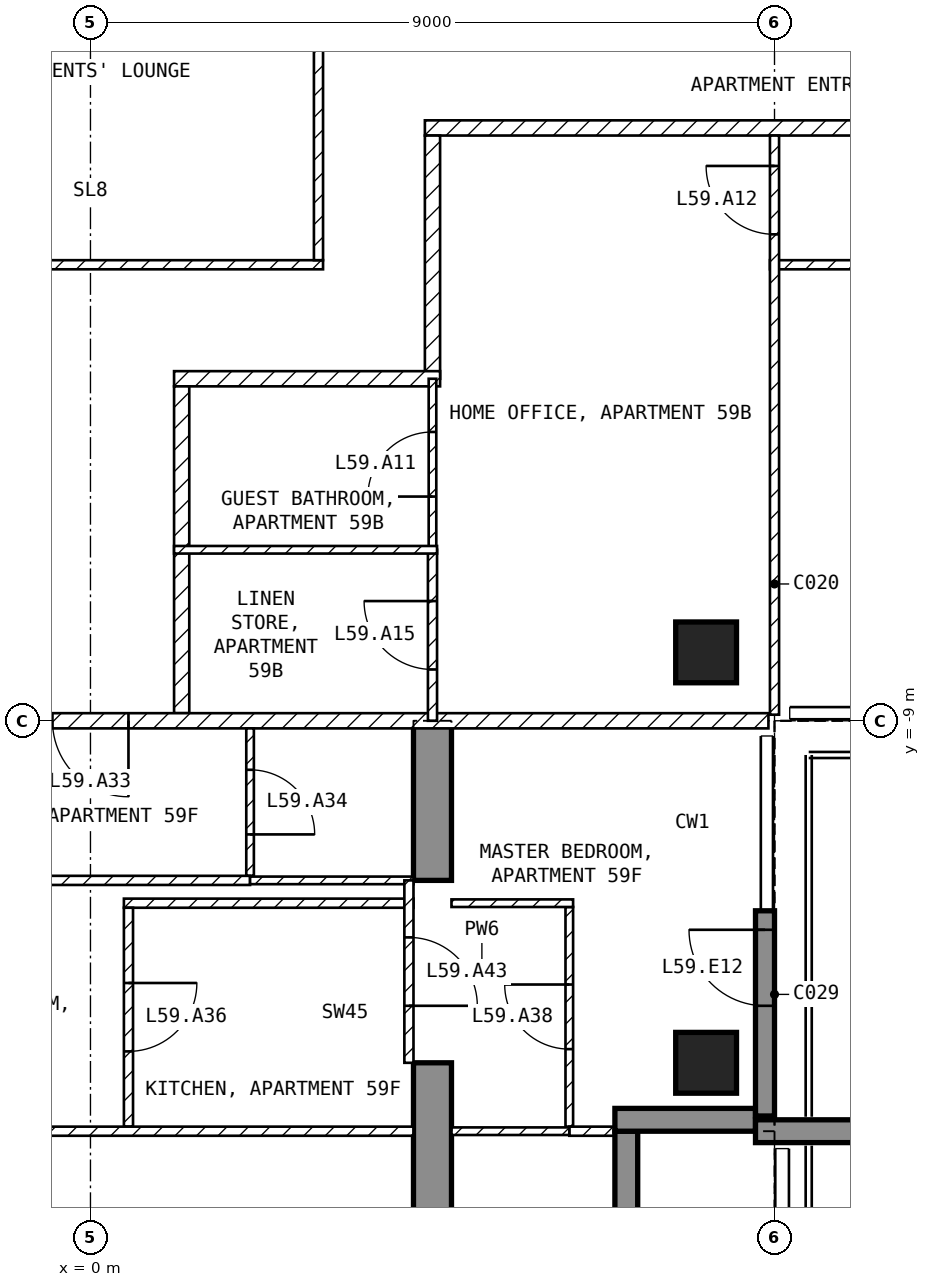
"""IFC4 building model, lengths in metres.
Left out: names, types, materials, properties, quantities, classifications, styles, units other than length and angle.
Written with IfcOpenShell. Run it as: python <this file> out.ifc"""

import sys

from ifc_helpers import new_model, si_unit, direction, frame, frame_2d, origin, origin_2d, place, context, subcontext, project, spatial, polyline, rectangle, outline, extrude, element, fill, save


model = new_model("IFC4")
c1 = context("Model", 3, precision=1e-05, world=origin(), true_north=direction((0.0, 1.0)))
c2 = subcontext(c1, "Body", "Model", "MODEL_VIEW")
j1 = project(units=[si_unit("LENGTHUNIT", "METRE"), si_unit("PLANEANGLEUNIT", "RADIAN")], contexts=[c1])
p1 = place(None, origin())
s1 = spatial("IfcSite", under=j1, at=p1, CompositionType="ELEMENT")
p2 = place(p1, origin())
s2 = spatial("IfcBuilding", under=s1, at=p2, CompositionType="ELEMENT")
p3 = place(p2, frame((0.0, 0.0, 236.0)))
s3 = spatial("IfcBuildingStorey", under=s2, at=p3, CompositionType="ELEMENT", Elevation=236.0)
for number, where, z_axis, x_axis in (
    (1, (8.1, -13.5, -0.25), (0.0, 0.0, 1.0), (1.0, 0.0, 0.0)),
    (2, (8.1, -8.1, -0.25), (0.0, 0.0, 1.0), (1.0, 0.0, 0.0)),
):
    element("IfcColumn", number, at=place(p3, frame(where, z_axis=z_axis, x_axis=x_axis)), inside=s3, PredefinedType="COLUMN", context=c2, shape_type="SweptSolid", body=[
        extrude(rectangle(XDim=0.8, YDim=0.8, at=origin_2d()), origin(), (0.0, 0.0, 1.0), 3.5),
    ])
p4 = place(p3, frame((4.25, -16.7, -0.25), z_axis=(1.0, 0.0, 0.0), x_axis=(0.0, 1.0, 0.0)))
e3 = element("IfcWall", 3, at=p4, inside=s3, PredefinedType="SHEAR", context=c2, shape_type="SweptSolid", body=[
    extrude(outline(polyline([(0.0, 0.0), (3.2, 0.0), (3.2, 2.65), (5.6, 2.65), (5.6, 0.0), (7.7, 0.0), (7.7, 3.5), (0.0, 3.5), (0.0, 0.0)])), origin(), (0.0, 0.0, 1.0), 0.5),
])
p5 = place(p3, frame((8.875, -14.2, 0.0), z_axis=(0.0, 0.0, 1.0), x_axis=(0.0, 1.0, 0.0)))
e4 = element("IfcWall", 4, at=p5, inside=s3, PredefinedType="SOLIDWALL", context=c2, shape_type="SweptSolid", body=[
    extrude(rectangle(XDim=2.7, YDim=0.25, at=frame_2d((1.35, 0.0))), origin(), (0.0, 0.0, 1.0), 3.25),
])
p6 = place(p5, frame((1.45, 0.0, 0.0)))
e5 = element("IfcOpeningElement", 5, at=p6, cuts=e4, PredefinedType="OPENING", context=c2, shape_type="SweptSolid", body=[
    extrude(rectangle(XDim=1.0, YDim=2.4, at=frame_2d((0.5, 1.2))), frame((0.0, 0.135, 0.0), z_axis=(0.0, -1.0, 0.0), x_axis=(1.0, 0.0, 0.0)), (0.0, 0.0, 1.0), 0.27),
])
p7 = place(p3, frame((7.05, -16.2, 0.0), z_axis=(0.0, 0.0, 1.0), x_axis=(0.0, 1.0, 0.0)))
e6 = element("IfcWall", 6, at=p7, inside=s3, PredefinedType="SOLIDWALL", context=c2, shape_type="SweptSolid", body=[
    extrude(rectangle(XDim=1.8, YDim=0.3, at=frame_2d((0.9, 0.0))), origin(), (0.0, 0.0, 1.0), 3.25),
])
p8 = place(p3, frame((6.9, -14.25, 0.0), z_axis=(0.0, 0.0, 1.0), x_axis=(1.0, 0.0, 0.0)))
e7 = element("IfcWall", 7, at=p8, inside=s3, PredefinedType="SOLIDWALL", context=c2, shape_type="SweptSolid", body=[
    extrude(rectangle(XDim=1.85, YDim=0.3, at=frame_2d((0.925, 0.0))), origin(), (0.0, 0.0, 1.0), 3.25),
])
p9 = place(p3, frame((8.75, -14.4, 0.0), z_axis=(0.0, 0.0, 1.0), x_axis=(1.0, 0.0, 0.0)))
e8 = element("IfcWall", 8, at=p9, inside=s3, PredefinedType="SOLIDWALL", context=c2, shape_type="SweptSolid", body=[
    extrude(rectangle(XDim=2.95, YDim=0.3, at=frame_2d((1.475, 0.0))), origin(), (0.0, 0.0, 1.0), 3.25),
])
p10 = place(p3, frame((-3.06, -3.0, 0.0), z_axis=(0.0, 0.0, 1.0), x_axis=(1.0, 0.0, 0.0)))
e9 = element("IfcWall", 9, at=p10, inside=s3, PredefinedType="PARTITIONING", context=c2, shape_type="SweptSolid", body=[
    extrude(rectangle(XDim=6.12, YDim=0.12, at=frame_2d((3.06, 0.0))), origin(), (0.0, 0.0, 1.0), 3.25),
])
p11 = place(p3, frame((3.0, -2.94, 0.0), z_axis=(0.0, 0.0, 1.0), x_axis=(0.0, 1.0, 0.0)))
e10 = element("IfcWall", 10, at=p11, inside=s3, PredefinedType="PARTITIONING", context=c2, shape_type="SweptSolid", body=[
    extrude(rectangle(XDim=5.88, YDim=0.12, at=frame_2d((2.94, 0.0))), origin(), (0.0, 0.0, 1.0), 3.25),
])
p12 = place(p3, frame((21.6, -1.2, 0.0), z_axis=(0.0, 0.0, 1.0), x_axis=(-1.0, 0.0, 0.0)))
e11 = element("IfcWall", 11, at=p12, inside=s3, PredefinedType="PARTITIONING", context=c2, shape_type="SweptSolid", body=[
    extrude(rectangle(XDim=17.2, YDim=0.2, at=frame_2d((8.6, 0.0))), origin(), (0.0, 0.0, 1.0), 3.25),
])
p13 = place(p12, frame((10.3, 0.0, 0.0)))
e12 = element("IfcOpeningElement", 12, at=p13, cuts=e11, PredefinedType="OPENING", context=c2, shape_type="SweptSolid", body=[
    extrude(rectangle(XDim=1.0, YDim=2.1, at=frame_2d((0.5, 1.05))), frame((0.0, 0.11, 0.0), z_axis=(0.0, -1.0, 0.0), x_axis=(1.0, 0.0, 0.0)), (0.0, 0.0, 1.0), 0.22),
])
p14 = place(p3, frame((4.5, -1.3, 0.0), z_axis=(0.0, 0.0, 1.0), x_axis=(0.0, -1.0, 0.0)))
e13 = element("IfcWall", 13, at=p14, inside=s3, PredefinedType="PARTITIONING", context=c2, shape_type="SweptSolid", body=[
    extrude(rectangle(XDim=3.2, YDim=0.2, at=frame_2d((1.6, 0.0))), origin(), (0.0, 0.0, 1.0), 3.25),
])
p15 = place(p3, frame((4.6, -4.5, 0.0), z_axis=(0.0, 0.0, 1.0), x_axis=(-1.0, 0.0, 0.0)))
e14 = element("IfcWall", 14, at=p15, inside=s3, PredefinedType="PARTITIONING", context=c2, shape_type="SweptSolid", body=[
    extrude(rectangle(XDim=3.5, YDim=0.2, at=frame_2d((1.75, 0.0))), origin(), (0.0, 0.0, 1.0), 3.25),
])
p16 = place(p3, frame((1.2, -4.6, 0.0), z_axis=(0.0, 0.0, 1.0), x_axis=(0.0, -1.0, 0.0)))
e15 = element("IfcWall", 15, at=p16, inside=s3, PredefinedType="PARTITIONING", context=c2, shape_type="SweptSolid", body=[
    extrude(rectangle(XDim=4.3, YDim=0.2, at=frame_2d((2.15, 0.0))), origin(), (0.0, 0.0, 1.0), 3.25),
])
p17 = place(p3, frame((8.92, -9.0, 0.0), z_axis=(0.0, 0.0, 1.0), x_axis=(-1.0, 0.0, 0.0)))
e16 = element("IfcWall", 16, at=p17, inside=s3, PredefinedType="PARTITIONING", context=c2, shape_type="SweptSolid", body=[
    extrude(rectangle(XDim=17.84, YDim=0.2, at=frame_2d((8.92, 0.0))), origin(), (0.0, 0.0, 1.0), 3.25),
])
p18 = place(p17, frame((8.42, 0.0, 0.0)))
e17 = element("IfcOpeningElement", 17, at=p18, cuts=e16, PredefinedType="OPENING", context=c2, shape_type="SweptSolid", body=[
    extrude(rectangle(XDim=1.0, YDim=2.1, at=frame_2d((0.5, 1.05))), frame((0.0, 0.11, 0.0), z_axis=(0.0, -1.0, 0.0), x_axis=(1.0, 0.0, 0.0)), (0.0, 0.0, 1.0), 0.22),
])
p19 = place(p3, frame((17.4, -3.0, 0.0), z_axis=(0.0, 0.0, 1.0), x_axis=(-1.0, 0.0, 0.0)))
e18 = element("IfcWall", 18, at=p19, inside=s3, PredefinedType="PARTITIONING", context=c2, shape_type="SweptSolid", body=[
    extrude(rectangle(XDim=8.46, YDim=0.12, at=frame_2d((4.23, 0.0))), origin(), (0.0, 0.0, 1.0), 3.25),
])
p20 = place(p19, frame((0.45, 0.0, 0.0)))
e19 = element("IfcOpeningElement", 19, at=p20, cuts=e18, PredefinedType="OPENING", context=c2, shape_type="SweptSolid", body=[
    extrude(rectangle(XDim=0.9, YDim=2.1, at=frame_2d((0.45, 1.05))), frame((0.0, 0.07, 0.0), z_axis=(0.0, -1.0, 0.0), x_axis=(1.0, 0.0, 0.0)), (0.0, 0.0, 1.0), 0.14),
])
p21 = place(p19, frame((6.15, 0.0, 0.0)))
e20 = element("IfcOpeningElement", 20, at=p21, cuts=e18, PredefinedType="OPENING", context=c2, shape_type="SweptSolid", body=[
    extrude(rectangle(XDim=0.9, YDim=2.1, at=frame_2d((0.45, 1.05))), frame((0.0, 0.07, 0.0), z_axis=(0.0, -1.0, 0.0), x_axis=(1.0, 0.0, 0.0)), (0.0, 0.0, 1.0), 0.14),
])
p22 = place(p3, frame((9.0, -8.92, 0.0), z_axis=(0.0, 0.0, 1.0), x_axis=(0.0, 1.0, 0.0)))
e21 = element("IfcWall", 21, at=p22, inside=s3, PredefinedType="PARTITIONING", context=c2, shape_type="SweptSolid", body=[
    extrude(rectangle(XDim=7.62, YDim=0.12, at=frame_2d((3.81, 0.0))), origin(), (0.0, 0.0, 1.0), 3.25),
])
p23 = place(p22, frame((6.32, 0.0, 0.0)))
e22 = element("IfcOpeningElement", 22, at=p23, cuts=e21, PredefinedType="OPENING", context=c2, shape_type="SweptSolid", body=[
    extrude(rectangle(XDim=0.9, YDim=2.1, at=frame_2d((0.45, 1.05))), frame((0.0, 0.07, 0.0), z_axis=(0.0, -1.0, 0.0), x_axis=(1.0, 0.0, 0.0)), (0.0, 0.0, 1.0), 0.14),
])
p24 = place(p3, frame((4.5, -6.75, 0.0), z_axis=(0.0, 0.0, 1.0), x_axis=(0.0, 1.0, 0.0)))
e23 = element("IfcWall", 23, at=p24, inside=s3, PredefinedType="PARTITIONING", context=c2, shape_type="SweptSolid", body=[
    extrude(rectangle(XDim=2.25, YDim=0.1, at=frame_2d((1.125, 0.0))), origin(), (0.0, 0.0, 1.0), 3.25),
])
p25 = place(p24, frame((0.7, 0.0, 0.0)))
e24 = element("IfcOpeningElement", 24, at=p25, cuts=e23, PredefinedType="OPENING", context=c2, shape_type="SweptSolid", body=[
    extrude(rectangle(XDim=0.85, YDim=2.1, at=frame_2d((0.425, 1.05))), frame((0.0, 0.06, 0.0), z_axis=(0.0, -1.0, 0.0), x_axis=(1.0, 0.0, 0.0)), (0.0, 0.0, 1.0), 0.12),
])
p26 = place(p3, frame((4.5, -9.0, 0.0), z_axis=(0.0, 0.0, 1.0), x_axis=(0.0, 1.0, 0.0)))
e25 = element("IfcWall", 25, at=p26, inside=s3, PredefinedType="PARTITIONING", context=c2, shape_type="SweptSolid", body=[
    extrude(rectangle(XDim=2.25, YDim=0.12, at=frame_2d((1.125, 0.0))), origin(), (0.0, 0.0, 1.0), 3.25),
])
p27 = place(p26, frame((0.675, 0.0, 0.0)))
e26 = element("IfcOpeningElement", 26, at=p27, cuts=e25, PredefinedType="OPENING", context=c2, shape_type="SweptSolid", body=[
    extrude(rectangle(XDim=0.9, YDim=2.1, at=frame_2d((0.45, 1.05))), frame((0.0, 0.07, 0.0), z_axis=(0.0, -1.0, 0.0), x_axis=(1.0, 0.0, 0.0)), (0.0, 0.0, 1.0), 0.14),
])
p28 = place(p3, frame((4.56, -6.75, 0.0), z_axis=(0.0, 0.0, 1.0), x_axis=(-1.0, 0.0, 0.0)))
e27 = element("IfcWall", 27, at=p28, inside=s3, PredefinedType="PARTITIONING", context=c2, shape_type="SweptSolid", body=[
    extrude(rectangle(XDim=3.46, YDim=0.1, at=frame_2d((1.73, 0.0))), origin(), (0.0, 0.0, 1.0), 3.25),
])
p29 = place(p3, frame((2.1, -9.1, 0.0), z_axis=(0.0, 0.0, 1.0), x_axis=(0.0, -1.0, 0.0)))
e28 = element("IfcWall", 28, at=p29, inside=s3, PredefinedType="PARTITIONING", context=c2, shape_type="SweptSolid", body=[
    extrude(rectangle(XDim=1.94, YDim=0.1, at=frame_2d((0.97, 0.0))), origin(), (0.0, 0.0, 1.0), 3.25),
])
p30 = place(p29, frame((0.545, 0.0, 0.0)))
e29 = element("IfcOpeningElement", 29, at=p30, cuts=e28, PredefinedType="OPENING", context=c2, shape_type="SweptSolid", body=[
    extrude(rectangle(XDim=0.85, YDim=2.1, at=frame_2d((0.425, 1.05))), frame((0.0, 0.06, 0.0), z_axis=(0.0, -1.0, 0.0), x_axis=(1.0, 0.0, 0.0)), (0.0, 0.0, 1.0), 0.12),
])
p31 = place(p3, frame((2.1, -11.1, 0.0), z_axis=(0.0, 0.0, 1.0), x_axis=(-1.0, 0.0, 0.0)))
e30 = element("IfcWall", 30, at=p31, inside=s3, PredefinedType="PARTITIONING", context=c2, shape_type="SweptSolid", body=[
    extrude(rectangle(XDim=6.35, YDim=0.12, at=frame_2d((3.175, 0.0))), origin(), (0.0, 0.0, 1.0), 3.25),
])
p32 = place(p31, frame((2.725, 0.0, 0.0)))
e31 = element("IfcOpeningElement", 31, at=p32, cuts=e30, PredefinedType="OPENING", context=c2, shape_type="SweptSolid", body=[
    extrude(rectangle(XDim=0.9, YDim=2.1, at=frame_2d((0.45, 1.05))), frame((0.0, 0.07, 0.0), z_axis=(0.0, -1.0, 0.0), x_axis=(1.0, 0.0, 0.0)), (0.0, 0.0, 1.0), 0.14),
])
p33 = place(p3, frame((4.25, -11.1, 0.0), z_axis=(0.0, 0.0, 1.0), x_axis=(-1.0, 0.0, 0.0)))
e32 = element("IfcWall", 32, at=p33, inside=s3, PredefinedType="PARTITIONING", context=c2, shape_type="SweptSolid", body=[
    extrude(rectangle(XDim=2.15, YDim=0.1, at=frame_2d((1.075, 0.0))), origin(), (0.0, 0.0, 1.0), 3.25),
])
p34 = place(p3, frame((4.25, -11.4, 0.0), z_axis=(0.0, 0.0, 1.0), x_axis=(-1.0, 0.0, 0.0)))
e33 = element("IfcWall", 33, at=p34, inside=s3, PredefinedType="PARTITIONING", context=c2, shape_type="SweptSolid", body=[
    extrude(rectangle(XDim=3.81, YDim=0.12, at=frame_2d((1.905, 0.0))), origin(), (0.0, 0.0, 1.0), 3.25),
])
p35 = place(p3, frame((0.5, -11.46, 0.0), z_axis=(0.0, 0.0, 1.0), x_axis=(0.0, -1.0, 0.0)))
e34 = element("IfcWall", 34, at=p35, inside=s3, PredefinedType="PARTITIONING", context=c2, shape_type="SweptSolid", body=[
    extrude(rectangle(XDim=2.88, YDim=0.12, at=frame_2d((1.44, 0.0))), origin(), (0.0, 0.0, 1.0), 3.25),
])
p36 = place(p35, frame((0.99, 0.0, 0.0)))
e35 = element("IfcOpeningElement", 35, at=p36, cuts=e34, PredefinedType="OPENING", context=c2, shape_type="SweptSolid", body=[
    extrude(rectangle(XDim=0.9, YDim=2.1, at=frame_2d((0.45, 1.05))), frame((0.0, 0.07, 0.0), z_axis=(0.0, -1.0, 0.0), x_axis=(1.0, 0.0, 0.0)), (0.0, 0.0, 1.0), 0.14),
])
p37 = place(p3, frame((4.25, -14.4, 0.0), z_axis=(0.0, 0.0, 1.0), x_axis=(-1.0, 0.0, 0.0)))
e36 = element("IfcWall", 36, at=p37, inside=s3, PredefinedType="PARTITIONING", context=c2, shape_type="SweptSolid", body=[
    extrude(rectangle(XDim=8.5, YDim=0.12, at=frame_2d((4.25, 0.0))), origin(), (0.0, 0.0, 1.0), 3.25),
])
p38 = place(p37, frame((5.675, 0.0, 0.0)))
e37 = element("IfcOpeningElement", 37, at=p38, cuts=e36, PredefinedType="OPENING", context=c2, shape_type="SweptSolid", body=[
    extrude(rectangle(XDim=0.9, YDim=2.1, at=frame_2d((0.45, 1.05))), frame((0.0, 0.07, 0.0), z_axis=(0.0, -1.0, 0.0), x_axis=(1.0, 0.0, 0.0)), (0.0, 0.0, 1.0), 0.14),
])
p39 = place(p3, frame((6.3, -14.34, 0.0), z_axis=(0.0, 0.0, 1.0), x_axis=(0.0, 1.0, 0.0)))
e38 = element("IfcWall", 38, at=p39, inside=s3, PredefinedType="PARTITIONING", context=c2, shape_type="SweptSolid", body=[
    extrude(rectangle(XDim=2.89, YDim=0.1, at=frame_2d((1.445, 0.0))), origin(), (0.0, 0.0, 1.0), 3.25),
])
p40 = place(p39, frame((1.02, 0.0, 0.0)))
e39 = element("IfcOpeningElement", 39, at=p40, cuts=e38, PredefinedType="OPENING", context=c2, shape_type="SweptSolid", body=[
    extrude(rectangle(XDim=0.85, YDim=2.1, at=frame_2d((0.425, 1.05))), frame((0.0, 0.06, 0.0), z_axis=(0.0, -1.0, 0.0), x_axis=(1.0, 0.0, 0.0)), (0.0, 0.0, 1.0), 0.12),
])
p41 = place(p3, frame((6.35, -11.4, 0.0), z_axis=(0.0, 0.0, 1.0), x_axis=(-1.0, 0.0, 0.0)))
e40 = element("IfcWall", 40, at=p41, inside=s3, PredefinedType="PARTITIONING", context=c2, shape_type="SweptSolid", body=[
    extrude(rectangle(XDim=1.6, YDim=0.1, at=frame_2d((0.8, 0.0))), origin(), (0.0, 0.0, 1.0), 3.25),
])
p42 = place(p3, frame((7.12, -14.4, 0.0), z_axis=(0.0, 0.0, 1.0), x_axis=(-1.0, 0.0, 0.0)))
e41 = element("IfcWall", 41, at=p42, inside=s3, PredefinedType="PARTITIONING", context=c2, shape_type="SweptSolid", body=[
    extrude(rectangle(XDim=0.82, YDim=0.12, at=frame_2d((0.41, 0.0))), origin(), (0.0, 0.0, 1.0), 3.25),
])
p43 = place(p3, frame((6.3, -14.4, 0.0), z_axis=(0.0, 0.0, 1.0), x_axis=(-1.0, 0.0, 0.0)))
e42 = element("IfcWall", 42, at=p43, inside=s3, PredefinedType="PARTITIONING", context=c2, shape_type="SweptSolid", body=[
    extrude(rectangle(XDim=1.55, YDim=0.1, at=frame_2d((0.775, 0.0))), origin(), (0.0, 0.0, 1.0), 3.25),
])
p44 = place(p3, frame((4.19, -11.1, 0.0), z_axis=(0.0, 0.0, 1.0), x_axis=(0.0, -1.0, 0.0)))
e43 = element("IfcWall", 43, at=p44, inside=s3, PredefinedType="PARTITIONING", context=c2, shape_type="SweptSolid", body=[
    extrude(rectangle(XDim=2.4, YDim=0.12, at=frame_2d((1.2, 0.0))), origin(), (0.0, 0.0, 1.0), 2.4),
])
p45 = place(p44, frame((0.75, 0.0, 0.0)))
e44 = element("IfcOpeningElement", 44, at=p45, cuts=e43, PredefinedType="OPENING", context=c2, shape_type="SweptSolid", body=[
    extrude(rectangle(XDim=0.9, YDim=2.1, at=frame_2d((0.45, 1.05))), frame((0.0, 0.07, 0.0), z_axis=(0.0, -1.0, 0.0), x_axis=(1.0, 0.0, 0.0)), (0.0, 0.0, 1.0), 0.14),
])
p46 = place(p6, origin())
e45 = element("IfcDoor", 45, at=p46, inside=s3, OperationType="SINGLE_SWING_RIGHT", PredefinedType="DOOR", context=c2, shape_type="SweptSolid", body=[
    extrude(rectangle(XDim=1.0, YDim=2.4, at=frame_2d((0.5, 1.2))), frame((0.0, 0.025, 0.0), z_axis=(0.0, -1.0, 0.0), x_axis=(1.0, 0.0, 0.0)), (0.0, 0.0, 1.0), 0.05),
])
fill(e5, e45)
p47 = place(p25, origin())
e46 = element("IfcDoor", 46, at=p47, inside=s3, OperationType="SINGLE_SWING_LEFT", PredefinedType="DOOR", context=c2, shape_type="SweptSolid", body=[
    extrude(rectangle(XDim=0.85, YDim=2.1, at=frame_2d((0.425, 1.05))), frame((0.0, 0.025, 0.0), z_axis=(0.0, -1.0, 0.0), x_axis=(1.0, 0.0, 0.0)), (0.0, 0.0, 1.0), 0.05),
])
fill(e24, e46)
p48 = place(p23, origin())
e47 = element("IfcDoor", 47, at=p48, inside=s3, OperationType="SINGLE_SWING_RIGHT", PredefinedType="DOOR", context=c2, shape_type="SweptSolid", body=[
    extrude(rectangle(XDim=0.9, YDim=2.1, at=frame_2d((0.45, 1.05))), frame((0.0, 0.025, 0.0), z_axis=(0.0, -1.0, 0.0), x_axis=(1.0, 0.0, 0.0)), (0.0, 0.0, 1.0), 0.05),
])
fill(e22, e47)
p49 = place(p27, origin())
e48 = element("IfcDoor", 48, at=p49, inside=s3, OperationType="SINGLE_SWING_RIGHT", PredefinedType="DOOR", context=c2, shape_type="SweptSolid", body=[
    extrude(rectangle(XDim=0.9, YDim=2.1, at=frame_2d((0.45, 1.05))), frame((0.0, 0.025, 0.0), z_axis=(0.0, -1.0, 0.0), x_axis=(1.0, 0.0, 0.0)), (0.0, 0.0, 1.0), 0.05),
])
fill(e26, e48)
p50 = place(p18, origin())
e49 = element("IfcDoor", 49, at=p50, inside=s3, OperationType="SINGLE_SWING_LEFT", PredefinedType="DOOR", context=c2, shape_type="SweptSolid", body=[
    extrude(rectangle(XDim=1.0, YDim=2.1, at=frame_2d((0.5, 1.05))), frame((0.0, 0.025, 0.0), z_axis=(0.0, -1.0, 0.0), x_axis=(1.0, 0.0, 0.0)), (0.0, 0.0, 1.0), 0.05),
])
fill(e17, e49)
p51 = place(p30, origin())
e50 = element("IfcDoor", 50, at=p51, inside=s3, OperationType="SINGLE_SWING_RIGHT", PredefinedType="DOOR", context=c2, shape_type="SweptSolid", body=[
    extrude(rectangle(XDim=0.85, YDim=2.1, at=frame_2d((0.425, 1.05))), frame((0.0, 0.025, 0.0), z_axis=(0.0, -1.0, 0.0), x_axis=(1.0, 0.0, 0.0)), (0.0, 0.0, 1.0), 0.05),
])
fill(e29, e50)
p52 = place(p36, origin())
e51 = element("IfcDoor", 51, at=p52, inside=s3, OperationType="SINGLE_SWING_LEFT", PredefinedType="DOOR", context=c2, shape_type="SweptSolid", body=[
    extrude(rectangle(XDim=0.9, YDim=2.1, at=frame_2d((0.45, 1.05))), frame((0.0, 0.025, 0.0), z_axis=(0.0, -1.0, 0.0), x_axis=(1.0, 0.0, 0.0)), (0.0, 0.0, 1.0), 0.05),
])
fill(e35, e51)
p53 = place(p40, origin())
e52 = element("IfcDoor", 52, at=p53, inside=s3, OperationType="SINGLE_SWING_RIGHT", PredefinedType="DOOR", context=c2, shape_type="SweptSolid", body=[
    extrude(rectangle(XDim=0.85, YDim=2.1, at=frame_2d((0.425, 1.05))), frame((0.0, 0.025, 0.0), z_axis=(0.0, -1.0, 0.0), x_axis=(1.0, 0.0, 0.0)), (0.0, 0.0, 1.0), 0.05),
])
fill(e39, e52)
p54 = place(p45, origin())
e53 = element("IfcDoor", 53, at=p54, inside=s3, OperationType="SINGLE_SWING_RIGHT", PredefinedType="DOOR", context=c2, shape_type="SweptSolid", body=[
    extrude(rectangle(XDim=0.9, YDim=2.1, at=frame_2d((0.45, 1.05))), frame((0.0, 0.025, 0.0), z_axis=(0.0, -1.0, 0.0), x_axis=(1.0, 0.0, 0.0)), (0.0, 0.0, 1.0), 0.05),
])
fill(e44, e53)
save(model, sys.argv[1])
